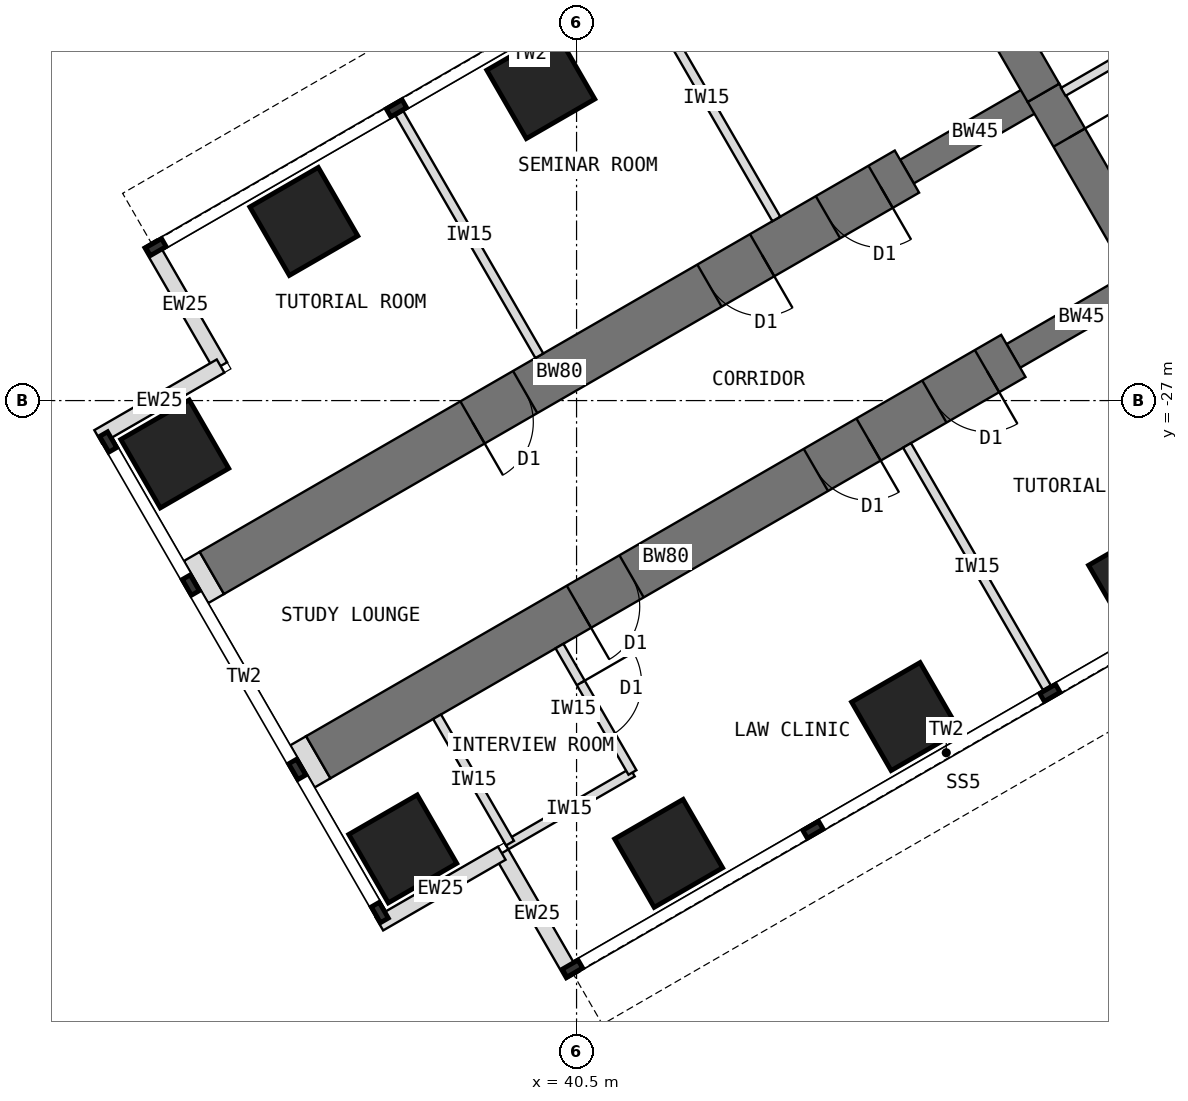
"""IFC4 building model, lengths in metres.
Left out: names, types, materials, properties, quantities, classifications, styles, units other than length and angle.
Written with IfcOpenShell. Run it as: python <this file> out.ifc"""

import sys

from ifc_helpers import new_model, si_unit, direction, frame, frame_2d, origin, origin_2d, place, context, subcontext, project, spatial, rectangle, extrude, element, fill, save


model = new_model("IFC4")
c1 = context("Model", 3, precision=1e-05, world=origin(), true_north=direction((0.0, 1.0)))
c2 = subcontext(c1, "Body", "Model", "MODEL_VIEW")
j1 = project(units=[si_unit("LENGTHUNIT", "METRE"), si_unit("PLANEANGLEUNIT", "RADIAN")], contexts=[c1])
p1 = place(None, origin())
s1 = spatial("IfcSite", under=j1, at=p1, CompositionType="ELEMENT")
p2 = place(p1, origin())
s2 = spatial("IfcBuilding", under=s1, at=p2, CompositionType="ELEMENT")
p3 = place(p2, frame((0.0, 0.0, 121.5)))
s3 = spatial("IfcBuildingStorey", under=s2, at=p3, CompositionType="ELEMENT", Elevation=121.5)
p4 = place(p3, frame((45.904, -18.0, 0.0), z_axis=(0.0, 0.0, 1.0), x_axis=(0.500024481964, -0.866011268655, 0.0)))
e1 = element("IfcWall", 1, at=p4, inside=s3, PredefinedType="SHEAR", context=c2, shape_type="SweptSolid", body=[
    extrude(rectangle(XDim=4.548, YDim=0.6, at=frame_2d((2.274, 0.0))), origin(), (0.0, 0.0, 1.0), 4.0),
])
p5 = place(p3, frame((48.178, -21.939, 0.0), z_axis=(0.0, 0.0, 1.0), x_axis=(0.500010275428, -0.866019471182, 0.0)))
e2 = element("IfcWall", 2, at=p5, inside=s3, PredefinedType="SHEAR", context=c2, shape_type="SweptSolid", body=[
    extrude(rectangle(XDim=3.5, YDim=0.6, at=frame_2d((1.75, 0.0))), origin(), (0.0, 0.0, 1.0), 4.0),
])
p6 = place(p5, frame((0.85, 0.0, 0.0)))
e3 = element("IfcOpeningElement", 3, at=p6, cuts=e2, PredefinedType="OPENING", context=c2, shape_type="SweptSolid", body=[
    extrude(rectangle(XDim=1.8, YDim=2.1, at=frame_2d((0.9, 1.05))), frame((0.0, 0.31, 0.0), z_axis=(0.0, -1.0, 0.0), x_axis=(1.0, 0.0, 0.0)), (0.0, 0.0, 1.0), 0.62),
])
p7 = place(p3, frame((49.928, -24.97, 0.0), z_axis=(0.0, 0.0, 1.0), x_axis=(-0.866031863473, -0.499988811324, 0.0)))
e4 = element("IfcWall", 4, at=p7, inside=s3, PredefinedType="SHEAR", context=c2, shape_type="SweptSolid", body=[
    extrude(rectangle(XDim=2.592, YDim=0.45, at=frame_2d((1.296, 0.0))), origin(), (0.0, 0.0, 1.0), 4.0),
])
p8 = place(p3, frame((47.684, -26.266, 0.0), z_axis=(0.0, 0.0, 1.0), x_axis=(-0.866027579429, -0.499996231654, 0.0)))
e5 = element("IfcWall", 5, at=p8, inside=s3, PredefinedType="SHEAR", context=c2, shape_type="SweptSolid", body=[
    extrude(rectangle(XDim=13.2, YDim=0.8, at=frame_2d((6.6, 0.0))), origin(), (0.0, 0.0, 1.0), 4.0),
])
p9 = place(p8, frame((0.5, 0.0, 0.0)))
e6 = element("IfcOpeningElement", 6, at=p9, cuts=e5, PredefinedType="OPENING", context=c2, shape_type="SweptSolid", body=[
    extrude(rectangle(XDim=1.0, YDim=2.1, at=frame_2d((0.5, 1.05))), frame((0.0, 0.41, 0.0), z_axis=(0.0, -1.0, 0.0), x_axis=(1.0, 0.0, 0.0)), (0.0, 0.0, 1.0), 0.82),
])
p10 = place(p8, frame((2.75, 0.0, 0.0)))
e7 = element("IfcOpeningElement", 7, at=p10, cuts=e5, PredefinedType="OPENING", context=c2, shape_type="SweptSolid", body=[
    extrude(rectangle(XDim=1.0, YDim=2.1, at=frame_2d((0.5, 1.05))), frame((0.0, 0.41, 0.0), z_axis=(0.0, -1.0, 0.0), x_axis=(1.0, 0.0, 0.0)), (0.0, 0.0, 1.0), 0.82),
])
p11 = place(p8, frame((7.25, 0.0, 0.0)))
e8 = element("IfcOpeningElement", 8, at=p11, cuts=e5, PredefinedType="OPENING", context=c2, shape_type="SweptSolid", body=[
    extrude(rectangle(XDim=1.0, YDim=2.1, at=frame_2d((0.5, 1.05))), frame((0.0, 0.41, 0.0), z_axis=(0.0, -1.0, 0.0), x_axis=(1.0, 0.0, 0.0)), (0.0, 0.0, 1.0), 0.82),
])
p12 = place(p3, frame((48.178, -21.939, 0.0), z_axis=(0.0, 0.0, 1.0), x_axis=(-0.866072649678, -0.499918158782, 0.0)))
e9 = element("IfcWall", 9, at=p12, inside=s3, PredefinedType="SHEAR", context=c2, shape_type="SweptSolid", body=[
    extrude(rectangle(XDim=2.592, YDim=0.45, at=frame_2d((1.296, 0.0))), origin(), (0.0, 0.0, 1.0), 4.0),
])
p13 = place(p3, frame((45.934, -23.234, 0.0), z_axis=(0.0, 0.0, 1.0), x_axis=(-0.866019570528, -0.500010103361, 0.0)))
e10 = element("IfcWall", 10, at=p13, inside=s3, PredefinedType="SHEAR", context=c2, shape_type="SweptSolid", body=[
    extrude(rectangle(XDim=13.2, YDim=0.8, at=frame_2d((6.6, 0.0))), origin(), (0.0, 0.0, 1.0), 4.0),
])
p14 = place(p13, frame((0.5, 0.0, 0.0)))
e11 = element("IfcOpeningElement", 11, at=p14, cuts=e10, PredefinedType="OPENING", context=c2, shape_type="SweptSolid", body=[
    extrude(rectangle(XDim=1.0, YDim=2.1, at=frame_2d((0.5, 1.05))), frame((0.0, 0.41, 0.0), z_axis=(0.0, -1.0, 0.0), x_axis=(1.0, 0.0, 0.0)), (0.0, 0.0, 1.0), 0.82),
])
p15 = place(p13, frame((2.75, 0.0, 0.0)))
e12 = element("IfcOpeningElement", 12, at=p15, cuts=e10, PredefinedType="OPENING", context=c2, shape_type="SweptSolid", body=[
    extrude(rectangle(XDim=1.0, YDim=2.1, at=frame_2d((0.5, 1.05))), frame((0.0, 0.41, 0.0), z_axis=(0.0, -1.0, 0.0), x_axis=(1.0, 0.0, 0.0)), (0.0, 0.0, 1.0), 0.82),
])
p16 = place(p13, frame((7.25, 0.0, 0.0)))
e13 = element("IfcOpeningElement", 13, at=p16, cuts=e10, PredefinedType="OPENING", context=c2, shape_type="SweptSolid", body=[
    extrude(rectangle(XDim=1.0, YDim=2.1, at=frame_2d((0.5, 1.05))), frame((0.0, 0.41, 0.0), z_axis=(0.0, -1.0, 0.0), x_axis=(1.0, 0.0, 0.0)), (0.0, 0.0, 1.0), 0.82),
])
for number, where, z_axis, x_axis in (
    (14, (49.809, -29.946, 0.0), (0.0, 0.0, 1.0), (0.866, 0.5, 0.0)),
    (15, (45.912, -32.196, 0.0), (0.0, 0.0, 1.0), (0.866, 0.5, 0.0)),
    (16, (39.912, -21.804, 0.0), (0.0, 0.0, 1.0), (0.866, 0.5, 0.0)),
    (17, (42.014, -34.446, 0.0), (0.0, 0.0, 1.0), (0.866, 0.5, 0.0)),
    (18, (36.014, -24.054, 0.0), (0.0, 0.0, 1.0), (0.866, 0.5, 0.0)),
    (19, (37.642, -34.373, 0.0), (0.0, 0.0, 1.0), (0.866, 0.5, 0.0)),
    (20, (33.892, -27.877, 0.0), (0.0, 0.0, 1.0), (0.866, 0.5, 0.0)),
):
    element("IfcColumn", number, at=place(p3, frame(where, z_axis=z_axis, x_axis=x_axis)), inside=s3, PredefinedType="COLUMN", context=c2, shape_type="SweptSolid", body=[
        extrude(rectangle(XDim=1.3, YDim=1.3, at=origin_2d()), origin(), (0.0, 0.0, 1.0), 4.0),
    ])
for number, where, z_axis, x_axis in (
    (21, (40.433, -36.456, 0.0), (0.0, 0.0, 1.0), (-0.5, 0.866, 0.0)),
    (22, (39.27, -34.443, 0.0), (0.0, 0.0, 1.0), (-0.866, -0.5, 0.0)),
    (23, (33.483, -24.419, 0.0), (0.0, 0.0, 1.0), (0.5, -0.866, 0.0)),
    (24, (34.645, -26.432, 0.0), (0.0, 0.0, 1.0), (-0.866, -0.5, 0.0)),
):
    element("IfcWall", number, at=place(p3, frame(where, z_axis=z_axis, x_axis=x_axis)), inside=s3, PredefinedType="STANDARD", context=c2, shape_type="SweptSolid", body=[
        extrude(rectangle(XDim=2.325, YDim=0.25, at=frame_2d((1.163, 0.0))), origin(), (0.0, 0.0, 1.0), 3.8),
    ])
p17 = place(p3, frame((36.252, -32.865, 0.0), z_axis=(0.0, 0.0, 1.0), x_axis=(-0.865778900179, -0.500426713919, 0.0)))
e25 = element("IfcWall", 25, at=p17, inside=s3, PredefinedType="PARTITIONING", context=c2, shape_type="SweptSolid", body=[
    extrude(rectangle(XDim=0.3, YDim=0.8, at=frame_2d((0.15, 0.0))), origin(), (0.0, 0.0, 1.0), 3.8),
])
p18 = place(p3, frame((34.502, -29.834, 0.0), z_axis=(0.0, 0.0, 1.0), x_axis=(-0.866131372301, -0.499816412211, 0.0)))
e26 = element("IfcWall", 26, at=p18, inside=s3, PredefinedType="PARTITIONING", context=c2, shape_type="SweptSolid", body=[
    extrude(rectangle(XDim=0.3, YDim=0.8, at=frame_2d((0.15, 0.0))), origin(), (0.0, 0.0, 1.0), 3.8),
])
p19 = place(p3, frame((45.935, -27.737, 0.0), z_axis=(0.0, 0.0, 1.0), x_axis=(0.500014953309, -0.866016770315, 0.0)))
e27 = element("IfcWall", 27, at=p19, inside=s3, PredefinedType="PARTITIONING", context=c2, shape_type="SweptSolid", body=[
    extrude(rectangle(XDim=4.6, YDim=0.15, at=frame_2d((2.3, 0.0))), origin(), (0.0, 0.0, 1.0), 3.8),
])
p20 = place(p3, frame((41.419, -33.115, 0.0), z_axis=(0.0, 0.0, 1.0), x_axis=(-0.866050077142, -0.499957262057, 0.0)))
e28 = element("IfcWall", 28, at=p20, inside=s3, PredefinedType="PARTITIONING", context=c2, shape_type="SweptSolid", body=[
    extrude(rectangle(XDim=2.4, YDim=0.15, at=frame_2d((1.2, 0.0))), origin(), (0.0, 0.0, 1.0), 3.8),
])
p21 = place(p3, frame((40.219, -31.037, 0.0), z_axis=(0.0, 0.0, 1.0), x_axis=(0.500033551112, -0.866006032174, 0.0)))
e29 = element("IfcWall", 29, at=p21, inside=s3, PredefinedType="PARTITIONING", context=c2, shape_type="SweptSolid", body=[
    extrude(rectangle(XDim=2.4, YDim=0.15, at=frame_2d((1.2, 0.0))), origin(), (0.0, 0.0, 1.0), 3.8),
])
p22 = place(p21, frame((0.7, 0.0, 0.0)))
e30 = element("IfcOpeningElement", 30, at=p22, cuts=e29, PredefinedType="OPENING", context=c2, shape_type="SweptSolid", body=[
    extrude(rectangle(XDim=1.0, YDim=2.1, at=frame_2d((0.5, 1.05))), frame((0.0, 0.085, 0.0), z_axis=(0.0, -1.0, 0.0), x_axis=(1.0, 0.0, 0.0)), (0.0, 0.0, 1.0), 0.17),
])
p23 = place(p3, frame((38.206, -32.199, 0.0), z_axis=(0.0, 0.0, 1.0), x_axis=(0.500001309137, -0.866024647952, 0.0)))
e31 = element("IfcWall", 31, at=p23, inside=s3, PredefinedType="PARTITIONING", context=c2, shape_type="SweptSolid", body=[
    extrude(rectangle(XDim=2.4, YDim=0.15, at=frame_2d((1.2, 0.0))), origin(), (0.0, 0.0, 1.0), 3.8),
])
for number, where, z_axis, x_axis in (
    (32, (43.785, -24.013, 0.0), (0.0, 0.0, 1.0), (-0.5, 0.866, 0.0)),
    (33, (39.888, -26.263, 0.0), (0.0, 0.0, 1.0), (-0.5, 0.866, 0.0)),
):
    element("IfcWall", number, at=place(p3, frame(where, z_axis=z_axis, x_axis=x_axis)), inside=s3, PredefinedType="PARTITIONING", context=c2, shape_type="SweptSolid", body=[
        extrude(rectangle(XDim=4.6, YDim=0.15, at=frame_2d((2.3, 0.0))), origin(), (0.0, 0.0, 1.0), 3.8),
    ])
p24 = place(p3, frame((48.504, -21.924, 0.0), z_axis=(0.0, 0.0, 1.0), x_axis=(0.866006515865, 0.500032713409, 0.0)))
e34 = element("IfcWall", 34, at=p24, inside=s3, PredefinedType="PARTITIONING", context=c2, shape_type="SweptSolid", body=[
    extrude(rectangle(XDim=4.518, YDim=0.15, at=frame_2d((2.259, 0.0))), origin(), (0.0, 0.0, 1.0), 3.8),
])
p25 = place(p24, frame((1.749, 0.0, 0.0)))
e35 = element("IfcOpeningElement", 35, at=p25, cuts=e34, PredefinedType="OPENING", context=c2, shape_type="SweptSolid", body=[
    extrude(rectangle(XDim=1.0, YDim=2.1, at=frame_2d((0.5, 1.05))), frame((0.0, 0.085, 0.0), z_axis=(0.0, -1.0, 0.0), x_axis=(1.0, 0.0, 0.0)), (0.0, 0.0, 1.0), 0.17),
])
p26 = place(p6, origin())
e36 = element("IfcDoor", 36, at=p26, inside=s3, OperationType="DOUBLE_DOOR_DOUBLE_SWING", PredefinedType="DOOR", context=c2, shape_type="SweptSolid", body=[
    extrude(rectangle(XDim=1.72, YDim=2.06, at=frame_2d((0.9, 1.03))), frame((0.0, 0.025, 0.0), z_axis=(0.0, -1.0, 0.0), x_axis=(1.0, 0.0, 0.0)), (0.0, 0.0, 1.0), 0.05),
    extrude(rectangle(XDim=0.04, YDim=2.1, at=frame_2d((0.02, 1.05))), frame((0.0, 0.3, 0.0), z_axis=(0.0, -1.0, 0.0), x_axis=(1.0, 0.0, 0.0)), (0.0, 0.0, 1.0), 0.6),
    extrude(rectangle(XDim=0.04, YDim=2.1, at=frame_2d((1.78, 1.05))), frame((0.0, 0.3, 0.0), z_axis=(0.0, -1.0, 0.0), x_axis=(1.0, 0.0, 0.0)), (0.0, 0.0, 1.0), 0.6),
    extrude(rectangle(XDim=1.72, YDim=0.04, at=frame_2d((0.9, 2.08))), frame((0.0, 0.3, 0.0), z_axis=(0.0, -1.0, 0.0), x_axis=(1.0, 0.0, 0.0)), (0.0, 0.0, 1.0), 0.6),
])
fill(e3, e36)
p27 = place(p22, origin())
e37 = element("IfcDoor", 37, at=p27, inside=s3, OperationType="SINGLE_SWING_LEFT", PredefinedType="DOOR", context=c2, shape_type="SweptSolid", body=[
    extrude(rectangle(XDim=1.0, YDim=2.1, at=frame_2d((0.5, 1.05))), frame((0.0, 0.025, 0.0), z_axis=(0.0, -1.0, 0.0), x_axis=(1.0, 0.0, 0.0)), (0.0, 0.0, 1.0), 0.05),
])
fill(e30, e37)
p28 = place(p9, origin())
e38 = element("IfcDoor", 38, at=p28, inside=s3, OperationType="SINGLE_SWING_LEFT", PredefinedType="DOOR", context=c2, shape_type="SweptSolid", body=[
    extrude(rectangle(XDim=0.92, YDim=2.06, at=frame_2d((0.5, 1.03))), frame((0.0, 0.025, 0.0), z_axis=(0.0, -1.0, 0.0), x_axis=(1.0, 0.0, 0.0)), (0.0, 0.0, 1.0), 0.05),
    extrude(rectangle(XDim=0.04, YDim=2.1, at=frame_2d((0.02, 1.05))), frame((0.0, 0.4, 0.0), z_axis=(0.0, -1.0, 0.0), x_axis=(1.0, 0.0, 0.0)), (0.0, 0.0, 1.0), 0.8),
    extrude(rectangle(XDim=0.04, YDim=2.1, at=frame_2d((0.98, 1.05))), frame((0.0, 0.4, 0.0), z_axis=(0.0, -1.0, 0.0), x_axis=(1.0, 0.0, 0.0)), (0.0, 0.0, 1.0), 0.8),
    extrude(rectangle(XDim=0.92, YDim=0.04, at=frame_2d((0.5, 2.08))), frame((0.0, 0.4, 0.0), z_axis=(0.0, -1.0, 0.0), x_axis=(1.0, 0.0, 0.0)), (0.0, 0.0, 1.0), 0.8),
])
fill(e6, e38)
p29 = place(p10, origin())
e39 = element("IfcDoor", 39, at=p29, inside=s3, OperationType="SINGLE_SWING_LEFT", PredefinedType="DOOR", context=c2, shape_type="SweptSolid", body=[
    extrude(rectangle(XDim=0.92, YDim=2.06, at=frame_2d((0.5, 1.03))), frame((0.0, 0.025, 0.0), z_axis=(0.0, -1.0, 0.0), x_axis=(1.0, 0.0, 0.0)), (0.0, 0.0, 1.0), 0.05),
    extrude(rectangle(XDim=0.04, YDim=2.1, at=frame_2d((0.02, 1.05))), frame((0.0, 0.4, 0.0), z_axis=(0.0, -1.0, 0.0), x_axis=(1.0, 0.0, 0.0)), (0.0, 0.0, 1.0), 0.8),
    extrude(rectangle(XDim=0.04, YDim=2.1, at=frame_2d((0.98, 1.05))), frame((0.0, 0.4, 0.0), z_axis=(0.0, -1.0, 0.0), x_axis=(1.0, 0.0, 0.0)), (0.0, 0.0, 1.0), 0.8),
    extrude(rectangle(XDim=0.92, YDim=0.04, at=frame_2d((0.5, 2.08))), frame((0.0, 0.4, 0.0), z_axis=(0.0, -1.0, 0.0), x_axis=(1.0, 0.0, 0.0)), (0.0, 0.0, 1.0), 0.8),
])
fill(e7, e39)
p30 = place(p11, origin())
e40 = element("IfcDoor", 40, at=p30, inside=s3, OperationType="SINGLE_SWING_RIGHT", PredefinedType="DOOR", context=c2, shape_type="SweptSolid", body=[
    extrude(rectangle(XDim=0.92, YDim=2.06, at=frame_2d((0.5, 1.03))), frame((0.0, 0.025, 0.0), z_axis=(0.0, -1.0, 0.0), x_axis=(1.0, 0.0, 0.0)), (0.0, 0.0, 1.0), 0.05),
    extrude(rectangle(XDim=0.04, YDim=2.1, at=frame_2d((0.02, 1.05))), frame((0.0, 0.4, 0.0), z_axis=(0.0, -1.0, 0.0), x_axis=(1.0, 0.0, 0.0)), (0.0, 0.0, 1.0), 0.8),
    extrude(rectangle(XDim=0.04, YDim=2.1, at=frame_2d((0.98, 1.05))), frame((0.0, 0.4, 0.0), z_axis=(0.0, -1.0, 0.0), x_axis=(1.0, 0.0, 0.0)), (0.0, 0.0, 1.0), 0.8),
    extrude(rectangle(XDim=0.92, YDim=0.04, at=frame_2d((0.5, 2.08))), frame((0.0, 0.4, 0.0), z_axis=(0.0, -1.0, 0.0), x_axis=(1.0, 0.0, 0.0)), (0.0, 0.0, 1.0), 0.8),
])
fill(e8, e40)
p31 = place(p14, origin())
e41 = element("IfcDoor", 41, at=p31, inside=s3, OperationType="SINGLE_SWING_LEFT", PredefinedType="DOOR", context=c2, shape_type="SweptSolid", body=[
    extrude(rectangle(XDim=0.92, YDim=2.06, at=frame_2d((0.5, 1.03))), frame((0.0, 0.025, 0.0), z_axis=(0.0, -1.0, 0.0), x_axis=(1.0, 0.0, 0.0)), (0.0, 0.0, 1.0), 0.05),
    extrude(rectangle(XDim=0.04, YDim=2.1, at=frame_2d((0.02, 1.05))), frame((0.0, 0.4, 0.0), z_axis=(0.0, -1.0, 0.0), x_axis=(1.0, 0.0, 0.0)), (0.0, 0.0, 1.0), 0.8),
    extrude(rectangle(XDim=0.04, YDim=2.1, at=frame_2d((0.98, 1.05))), frame((0.0, 0.4, 0.0), z_axis=(0.0, -1.0, 0.0), x_axis=(1.0, 0.0, 0.0)), (0.0, 0.0, 1.0), 0.8),
    extrude(rectangle(XDim=0.92, YDim=0.04, at=frame_2d((0.5, 2.08))), frame((0.0, 0.4, 0.0), z_axis=(0.0, -1.0, 0.0), x_axis=(1.0, 0.0, 0.0)), (0.0, 0.0, 1.0), 0.8),
])
fill(e11, e41)
p32 = place(p15, origin())
e42 = element("IfcDoor", 42, at=p32, inside=s3, OperationType="SINGLE_SWING_LEFT", PredefinedType="DOOR", context=c2, shape_type="SweptSolid", body=[
    extrude(rectangle(XDim=0.92, YDim=2.06, at=frame_2d((0.5, 1.03))), frame((0.0, 0.025, 0.0), z_axis=(0.0, -1.0, 0.0), x_axis=(1.0, 0.0, 0.0)), (0.0, 0.0, 1.0), 0.05),
    extrude(rectangle(XDim=0.04, YDim=2.1, at=frame_2d((0.02, 1.05))), frame((0.0, 0.4, 0.0), z_axis=(0.0, -1.0, 0.0), x_axis=(1.0, 0.0, 0.0)), (0.0, 0.0, 1.0), 0.8),
    extrude(rectangle(XDim=0.04, YDim=2.1, at=frame_2d((0.98, 1.05))), frame((0.0, 0.4, 0.0), z_axis=(0.0, -1.0, 0.0), x_axis=(1.0, 0.0, 0.0)), (0.0, 0.0, 1.0), 0.8),
    extrude(rectangle(XDim=0.92, YDim=0.04, at=frame_2d((0.5, 2.08))), frame((0.0, 0.4, 0.0), z_axis=(0.0, -1.0, 0.0), x_axis=(1.0, 0.0, 0.0)), (0.0, 0.0, 1.0), 0.8),
])
fill(e12, e42)
p33 = place(p16, origin())
e43 = element("IfcDoor", 43, at=p33, inside=s3, OperationType="SINGLE_SWING_RIGHT", PredefinedType="DOOR", context=c2, shape_type="SweptSolid", body=[
    extrude(rectangle(XDim=0.92, YDim=2.06, at=frame_2d((0.5, 1.03))), frame((0.0, 0.025, 0.0), z_axis=(0.0, -1.0, 0.0), x_axis=(1.0, 0.0, 0.0)), (0.0, 0.0, 1.0), 0.05),
    extrude(rectangle(XDim=0.04, YDim=2.1, at=frame_2d((0.02, 1.05))), frame((0.0, 0.4, 0.0), z_axis=(0.0, -1.0, 0.0), x_axis=(1.0, 0.0, 0.0)), (0.0, 0.0, 1.0), 0.8),
    extrude(rectangle(XDim=0.04, YDim=2.1, at=frame_2d((0.98, 1.05))), frame((0.0, 0.4, 0.0), z_axis=(0.0, -1.0, 0.0), x_axis=(1.0, 0.0, 0.0)), (0.0, 0.0, 1.0), 0.8),
    extrude(rectangle(XDim=0.92, YDim=0.04, at=frame_2d((0.5, 2.08))), frame((0.0, 0.4, 0.0), z_axis=(0.0, -1.0, 0.0), x_axis=(1.0, 0.0, 0.0)), (0.0, 0.0, 1.0), 0.8),
])
fill(e13, e43)
save(model, sys.argv[1])
